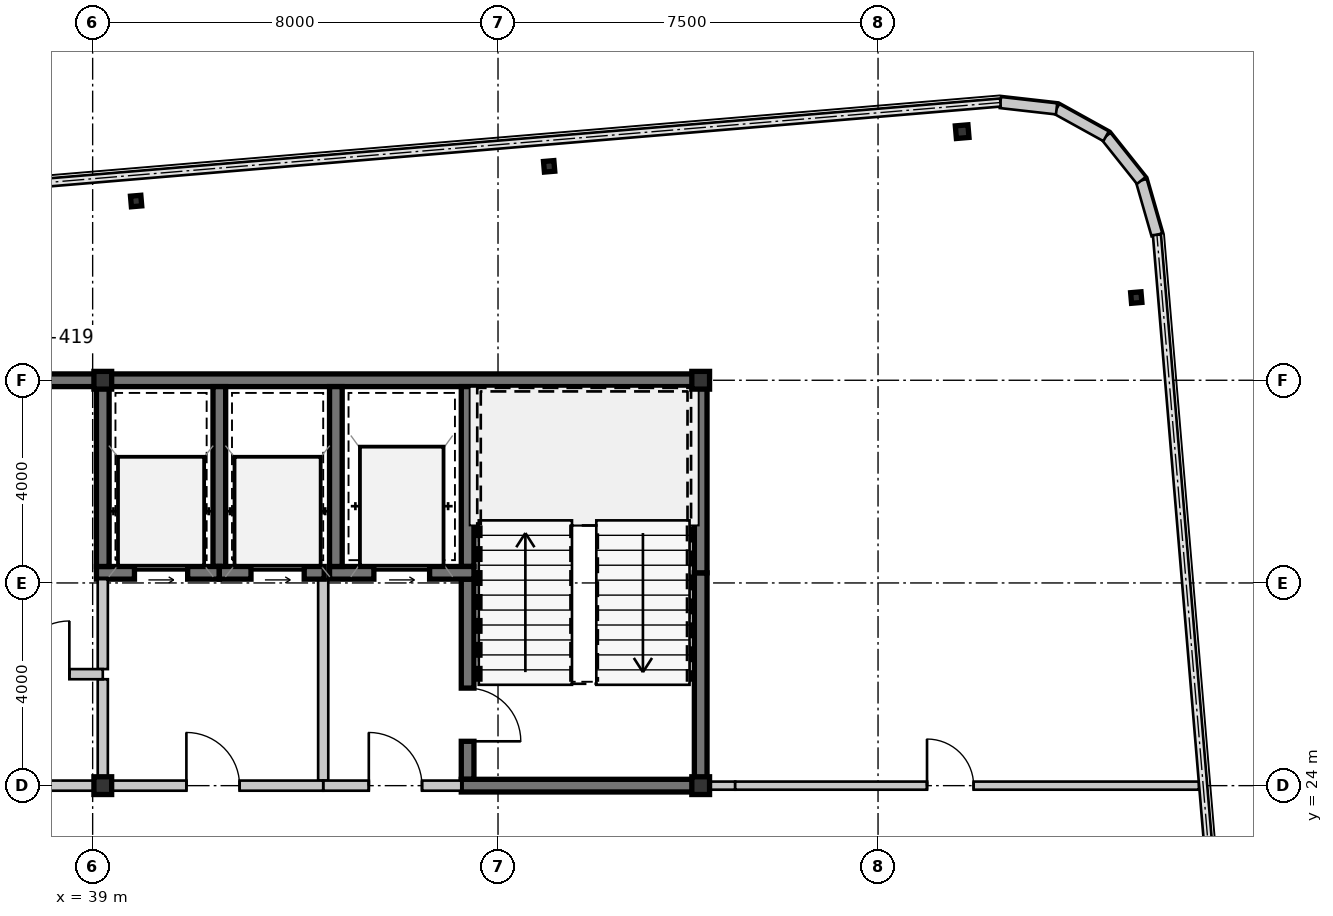
"""IFC4 building model, lengths in metres.
Left out: names, types, materials, properties, quantities, classifications, styles, units other than length and angle.
Written with IfcOpenShell. Run it as: python <this file> out.ifc"""

import sys

from ifc_helpers import new_model, si_unit, direction, frame, frame_2d, origin, origin_2d, place, context, subcontext, project, spatial, rectangle, hollow_rectangle, i_section, extrude, source, transform, mapped, element, fill, save


model = new_model("IFC4")
c1 = context("Model", 3, precision=1e-05, world=origin(), true_north=direction((0.0, 1.0)))
c2 = subcontext(c1, "Body", "Model", "MODEL_VIEW")
j1 = project(units=[si_unit("LENGTHUNIT", "METRE"), si_unit("PLANEANGLEUNIT", "RADIAN")], contexts=[c1])
p1 = place(None, origin())
s1 = spatial("IfcSite", under=j1, at=p1, CompositionType="ELEMENT")
p2 = place(p1, origin())
s2 = spatial("IfcBuilding", under=s1, at=p2, CompositionType="ELEMENT")
p3 = place(p2, frame((0.0, 0.0, 197.75)))
s3 = spatial("IfcBuildingStorey", under=s2, at=p3, CompositionType="ELEMENT", Elevation=197.75)
m1 = source(origin(), c2, "Body", "SweptSolid", [
    extrude(hollow_rectangle(XDim=0.35, YDim=0.35, WallThickness=0.016, at=origin_2d()), origin(), (0.0, 0.0, 1.0), 3.15),
])
for number, where, z_axis, x_axis in (
    (1, (39.2, 24.0, 0.0), (0.0, 0.0, 1.0), (1.0, 0.0, 0.0)),
    (2, (51.0, 24.0, 0.0), (0.0, 0.0, 1.0), (1.0, 0.0, 0.0)),
    (3, (39.2, 32.0, 0.0), (0.0, 0.0, 1.0), (1.0, 0.0, 0.0)),
    (4, (51.0, 32.0, 0.0), (0.0, 0.0, 1.0), (1.0, 0.0, 0.0)),
):
    element("IfcColumn", number, at=place(p3, frame(where, z_axis=z_axis, x_axis=x_axis)), inside=s3, PredefinedType="COLUMN", context=c2, shape_type="MappedRepresentation", body=[
        mapped(m1, transform((0.0, 0.0, 0.0), scale=1.0)),
    ])
m2 = source(origin(), c2, "Body", "SweptSolid", [
    extrude(i_section(OverallWidth=0.205, OverallDepth=0.21, WebThickness=0.009, FlangeThickness=0.014, at=origin_2d()), origin(), (0.0, 0.0, 1.0), 3.15),
])
for number, where, z_axis, x_axis in (
    (5, (39.858, 35.537, 0.0), (0.0, 0.0, 1.0), (0.996, 0.084, 0.0)),
    (6, (48.009, 36.221, 0.0), (0.0, 0.0, 1.0), (0.996, 0.084, 0.0)),
):
    element("IfcColumn", number, at=place(p3, frame(where, z_axis=z_axis, x_axis=x_axis)), inside=s3, PredefinedType="COLUMN", context=c2, shape_type="MappedRepresentation", body=[
        mapped(m2, transform((0.0, 0.0, 0.0), scale=1.0)),
    ])
m3 = source(origin(), c2, "Body", "SweptSolid", [
    extrude(hollow_rectangle(XDim=0.25, YDim=0.25, WallThickness=0.01, at=origin_2d()), origin(), (0.0, 0.0, 1.0), 3.15),
])
p4 = place(p3, frame((56.16, 36.906, 0.0), z_axis=(0.0, 0.0, 1.0), x_axis=(0.99649285925, 0.083677843332, 0.0)))
e7 = element("IfcColumn", 7, at=p4, inside=s3, PredefinedType="COLUMN", context=c2, shape_type="MappedRepresentation", body=[
    mapped(m3, transform((0.0, 0.0, 0.0), scale=1.0)),
])
p5 = place(p3, frame((59.596, 33.632, 0.0), z_axis=(0.0, 0.0, 1.0), x_axis=(0.99649285925, 0.083677843332, 0.0)))
e8 = element("IfcColumn", 8, at=p5, inside=s3, PredefinedType="COLUMN", context=c2, shape_type="MappedRepresentation", body=[
    mapped(m2, transform((0.0, 0.0, 0.0), scale=1.0)),
])
m4 = source(origin(), c2, "Body", "SweptSolid", [
    extrude(rectangle(XDim=1.116, YDim=0.22, at=frame_2d((0.558, 0.0))), origin(), (0.0, 0.0, 1.0), 2.93),
])
for number, where, z_axis, x_axis in (
    (9, (60.004, 34.87, 0.0), (0.0, 0.0, 1.0), (-0.277, 0.961, 0.0)),
    (10, (59.696, 35.943, 0.0), (0.0, 0.0, 1.0), (-0.623, 0.782, 0.0)),
    (11, (59.0, 36.816, 0.0), (0.0, 0.0, 1.0), (-0.875, 0.484, 0.0)),
    (12, (58.024, 37.356, 0.0), (0.0, 0.0, 1.0), (-0.994, 0.112, 0.0)),
):
    element("IfcWall", number, at=place(p3, frame(where, z_axis=z_axis, x_axis=x_axis)), inside=s3, PredefinedType="SOLIDWALL", context=c2, shape_type="MappedRepresentation", body=[
        mapped(m4, transform((0.0, 0.0, 0.0), scale=1.0)),
    ])
m5 = source(origin(), c2, "Body", "SweptSolid", [
    extrude(rectangle(XDim=11.2, YDim=0.25, at=frame_2d((5.6, 0.0))), origin(), (0.0, 0.0, 1.0), 2.93),
])
p6 = place(p3, frame((28.0, 32.0, 0.0), z_axis=(0.0, 0.0, 1.0), x_axis=(1.0, 0.0, 0.0)))
e13 = element("IfcWall", 13, at=p6, inside=s3, PredefinedType="SHEAR", context=c2, shape_type="MappedRepresentation", body=[
    mapped(m5, transform((0.0, 0.0, 0.0), scale=1.0)),
])
m6 = source(origin(), c2, "Body", "SweptSolid", [
    extrude(rectangle(XDim=11.925, YDim=0.25, at=frame_2d((5.962, 0.0))), origin(), (0.0, 0.0, 1.0), 2.93),
])
p7 = place(p3, frame((39.2, 32.0, 0.0), z_axis=(0.0, 0.0, 1.0), x_axis=(1.0, 0.0, 0.0)))
e14 = element("IfcWall", 14, at=p7, inside=s3, PredefinedType="SHEAR", context=c2, shape_type="MappedRepresentation", body=[
    mapped(m6, transform((0.0, 0.0, 0.0), scale=1.0)),
])
m7 = source(origin(), c2, "Body", "SweptSolid", [
    extrude(rectangle(XDim=4.075, YDim=0.25, at=frame_2d((2.038, 0.0))), origin(), (0.0, 0.0, 1.0), 2.93),
])
p8 = place(p3, frame((51.0, 24.125, 0.0), z_axis=(0.0, 0.0, 1.0), x_axis=(0.0, 1.0, 0.0)))
e15 = element("IfcWall", 15, at=p8, inside=s3, PredefinedType="SHEAR", context=c2, shape_type="MappedRepresentation", body=[
    mapped(m7, transform((0.0, 0.0, 0.0), scale=1.0)),
])
m8 = source(origin(), c2, "Body", "SweptSolid", [
    extrude(rectangle(XDim=3.675, YDim=0.25, at=frame_2d((1.837, 0.0))), origin(), (0.0, 0.0, 1.0), 2.93),
])
p9 = place(p3, frame((51.0, 28.2, 0.0), z_axis=(0.0, 0.0, 1.0), x_axis=(0.0, 1.0, 0.0)))
e16 = element("IfcWall", 16, at=p9, inside=s3, PredefinedType="SHEAR", context=c2, shape_type="MappedRepresentation", body=[
    mapped(m8, transform((0.0, 0.0, 0.0), scale=1.0)),
])
m9 = source(origin(), c2, "Body", "SweptSolid", [
    extrude(rectangle(XDim=3.55, YDim=0.25, at=frame_2d((1.775, 0.0))), origin(), (0.0, 0.0, 1.0), 2.93),
])
p10 = place(p3, frame((46.4, 31.875, 0.0), z_axis=(0.0, 0.0, 1.0), x_axis=(0.0, -1.0, 0.0)))
e17 = element("IfcWall", 17, at=p10, inside=s3, PredefinedType="SHEAR", context=c2, shape_type="MappedRepresentation", body=[
    mapped(m9, transform((0.0, 0.0, 0.0), scale=1.0)),
])
m10 = source(origin(), c2, "Body", "SweptSolid", [
    extrude(rectangle(XDim=3.95, YDim=0.25, at=frame_2d((1.975, 0.0))), origin(), (0.0, 0.0, 1.0), 2.93),
])
p11 = place(p3, frame((46.4, 28.075, 0.0), z_axis=(0.0, 0.0, 1.0), x_axis=(0.0, -1.0, 0.0)))
e18 = element("IfcWall", 18, at=p11, inside=s3, PredefinedType="SHEAR", context=c2, shape_type="MappedRepresentation", body=[
    mapped(m10, transform((0.0, 0.0, 0.0), scale=1.0)),
])
m11 = source(origin(), c2, "Body", "SweptSolid", [
    extrude(rectangle(XDim=1.05, YDim=2.1, at=frame_2d((0.525, 1.05))), frame((0.0, 0.135, 0.0), z_axis=(0.0, -1.0, 0.0), x_axis=(1.0, 0.0, 0.0)), (0.0, 0.0, 1.0), 0.27),
])
p12 = place(p11, frame((2.15, 0.0, 0.0)))
e19 = element("IfcOpeningElement", 19, at=p12, cuts=e18, PredefinedType="OPENING", context=c2, shape_type="MappedRepresentation", body=[
    mapped(m11, transform((0.0, 0.0, 0.0), scale=1.0)),
])
m12 = source(origin(), c2, "Body", "SweptSolid", [
    extrude(rectangle(XDim=4.85, YDim=0.25, at=frame_2d((2.425, 0.0))), origin(), (0.0, 0.0, 1.0), 2.93),
])
p13 = place(p3, frame((46.275, 24.0, 0.0), z_axis=(0.0, 0.0, 1.0), x_axis=(1.0, 0.0, 0.0)))
e20 = element("IfcWall", 20, at=p13, inside=s3, PredefinedType="SHEAR", context=c2, shape_type="MappedRepresentation", body=[
    mapped(m12, transform((0.0, 0.0, 0.0), scale=1.0)),
])
m13 = source(origin(), c2, "Body", "SweptSolid", [
    extrude(rectangle(XDim=2.85, YDim=0.25, at=frame_2d((1.425, 0.0))), origin(), (0.0, 0.0, 1.0), 2.93),
])
p14 = place(p3, frame((43.675, 28.2, 0.0), z_axis=(0.0, 0.0, 1.0), x_axis=(1.0, 0.0, 0.0)))
e21 = element("IfcWall", 21, at=p14, inside=s3, PredefinedType="SHEAR", context=c2, shape_type="MappedRepresentation", body=[
    mapped(m13, transform((0.0, 0.0, 0.0), scale=1.0)),
])
m14 = source(origin(), c2, "Body", "SweptSolid", [
    extrude(rectangle(XDim=1.1, YDim=2.15, at=frame_2d((0.55, 1.075))), frame((0.0, 0.135, 0.0), z_axis=(0.0, -1.0, 0.0), x_axis=(1.0, 0.0, 0.0)), (0.0, 0.0, 1.0), 0.27),
])
p15 = place(p14, frame((0.875, 0.0, 0.0)))
e22 = element("IfcOpeningElement", 22, at=p15, cuts=e21, PredefinedType="OPENING", context=c2, shape_type="MappedRepresentation", body=[
    mapped(m14, transform((0.0, 0.0, 0.0), scale=1.0)),
])
p16 = place(p3, frame((43.8, 31.875, 0.0), z_axis=(0.0, 0.0, 1.0), x_axis=(0.0, -1.0, 0.0)))
e23 = element("IfcWall", 23, at=p16, inside=s3, PredefinedType="SHEAR", context=c2, shape_type="MappedRepresentation", body=[
    mapped(m9, transform((0.0, 0.0, 0.0), scale=1.0)),
])
m15 = source(origin(), c2, "Body", "SweptSolid", [
    extrude(rectangle(XDim=3.975, YDim=0.2, at=frame_2d((1.987, 0.0))), origin(), (0.0, 0.0, 1.0), 2.93),
])
p17 = place(p3, frame((43.55, 28.075, 0.0), z_axis=(0.0, 0.0, 1.0), x_axis=(0.0, -1.0, 0.0)))
e24 = element("IfcWall", 24, at=p17, inside=s3, PredefinedType="SOLIDWALL", context=c2, shape_type="MappedRepresentation", body=[
    mapped(m15, transform((0.0, 0.0, 0.0), scale=1.0)),
])
m16 = source(origin(), c2, "Body", "SweptSolid", [
    extrude(rectangle(XDim=2.725, YDim=0.2, at=frame_2d((1.362, 0.0))), origin(), (0.0, 0.0, 1.0), 2.397),
])
p18 = place(p3, frame((43.55, 24.0, 0.0), z_axis=(0.0, 0.0, 1.0), x_axis=(1.0, 0.0, 0.0)))
e25 = element("IfcWall", 25, at=p18, inside=s3, PredefinedType="SOLIDWALL", context=c2, shape_type="MappedRepresentation", body=[
    mapped(m16, transform((0.0, 0.0, 0.0), scale=1.0)),
])
m17 = source(origin(), c2, "Body", "SweptSolid", [
    extrude(rectangle(XDim=1.05, YDim=2.1, at=frame_2d((0.525, 1.05))), frame((0.0, 0.11, 0.0), z_axis=(0.0, -1.0, 0.0), x_axis=(1.0, 0.0, 0.0)), (0.0, 0.0, 1.0), 0.22),
])
p19 = place(p18, frame((0.9, 0.0, 0.0)))
e26 = element("IfcOpeningElement", 26, at=p19, cuts=e25, PredefinedType="OPENING", context=c2, shape_type="MappedRepresentation", body=[
    mapped(m17, transform((0.0, 0.0, 0.0), scale=1.0)),
])
p20 = place(p3, frame((41.5, 28.325, 0.0), z_axis=(0.0, 0.0, 1.0), x_axis=(0.0, 1.0, 0.0)))
e27 = element("IfcWall", 27, at=p20, inside=s3, PredefinedType="SHEAR", context=c2, shape_type="MappedRepresentation", body=[
    mapped(m9, transform((0.0, 0.0, 0.0), scale=1.0)),
])
m18 = source(origin(), c2, "Body", "SweptSolid", [
    extrude(rectangle(XDim=2.425, YDim=0.25, at=frame_2d((1.212, 0.0))), origin(), (0.0, 0.0, 1.0), 2.93),
])
p21 = place(p3, frame((39.075, 28.2, 0.0), z_axis=(0.0, 0.0, 1.0), x_axis=(1.0, 0.0, 0.0)))
e28 = element("IfcWall", 28, at=p21, inside=s3, PredefinedType="SHEAR", context=c2, shape_type="MappedRepresentation", body=[
    mapped(m18, transform((0.0, 0.0, 0.0), scale=1.0)),
])
m19 = source(origin(), c2, "Body", "SweptSolid", [
    extrude(rectangle(XDim=1.05, YDim=2.15, at=frame_2d((0.525, 1.075))), frame((0.0, 0.135, 0.0), z_axis=(0.0, -1.0, 0.0), x_axis=(1.0, 0.0, 0.0)), (0.0, 0.0, 1.0), 0.27),
])
p22 = place(p21, frame((0.75, 0.0, 0.0)))
e29 = element("IfcOpeningElement", 29, at=p22, cuts=e28, PredefinedType="OPENING", context=c2, shape_type="MappedRepresentation", body=[
    mapped(m19, transform((0.0, 0.0, 0.0), scale=1.0)),
])
p23 = place(p3, frame((39.2, 31.875, 0.0), z_axis=(0.0, 0.0, 1.0), x_axis=(0.0, -1.0, 0.0)))
e30 = element("IfcWall", 30, at=p23, inside=s3, PredefinedType="SHEAR", context=c2, shape_type="MappedRepresentation", body=[
    mapped(m9, transform((0.0, 0.0, 0.0), scale=1.0)),
])
m20 = source(origin(), c2, "Body", "SweptSolid", [
    extrude(rectangle(XDim=2.07, YDim=0.25, at=frame_2d((1.035, 0.0))), origin(), (0.0, 0.0, 1.0), 2.93),
])
p24 = place(p3, frame((41.5, 28.2, 0.0), z_axis=(0.0, 0.0, 1.0), x_axis=(1.0, 0.0, 0.0)))
e31 = element("IfcWall", 31, at=p24, inside=s3, PredefinedType="SHEAR", context=c2, shape_type="MappedRepresentation", body=[
    mapped(m20, transform((0.0, 0.0, 0.0), scale=1.0)),
])
p25 = place(p24, frame((0.625, 0.0, 0.0)))
e32 = element("IfcOpeningElement", 32, at=p25, cuts=e31, PredefinedType="OPENING", context=c2, shape_type="MappedRepresentation", body=[
    mapped(m19, transform((0.0, 0.0, 0.0), scale=1.0)),
])
m21 = source(origin(), c2, "Body", "SweptSolid", [
    extrude(rectangle(XDim=2.0, YDim=0.2, at=frame_2d((1.0, 0.0))), origin(), (0.0, 0.0, 1.0), 2.47),
])
p26 = place(p3, frame((39.2, 24.1, 0.0), z_axis=(0.0, 0.0, 1.0), x_axis=(0.0, 1.0, 0.0)))
e33 = element("IfcWall", 33, at=p26, inside=s3, PredefinedType="SOLIDWALL", context=c2, shape_type="MappedRepresentation", body=[
    mapped(m21, transform((0.0, 0.0, 0.0), scale=1.0)),
])
m22 = source(origin(), c2, "Body", "SweptSolid", [
    extrude(rectangle(XDim=1.775, YDim=0.2, at=frame_2d((0.887, 0.0))), origin(), (0.0, 0.0, 1.0), 2.47),
])
p27 = place(p3, frame((39.2, 26.3, 0.0), z_axis=(0.0, 0.0, 1.0), x_axis=(0.0, 1.0, 0.0)))
e34 = element("IfcWall", 34, at=p27, inside=s3, PredefinedType="SOLIDWALL", context=c2, shape_type="MappedRepresentation", body=[
    mapped(m22, transform((0.0, 0.0, 0.0), scale=1.0)),
])
m23 = source(origin(), c2, "Body", "SweptSolid", [
    extrude(rectangle(XDim=4.35, YDim=0.2, at=frame_2d((2.175, 0.0))), origin(), (0.0, 0.0, 1.0), 2.397),
])
p28 = place(p3, frame((43.55, 24.0, 0.0), z_axis=(0.0, 0.0, 1.0), x_axis=(-1.0, 0.0, 0.0)))
e35 = element("IfcWall", 35, at=p28, inside=s3, PredefinedType="SOLIDWALL", context=c2, shape_type="MappedRepresentation", body=[
    mapped(m23, transform((0.0, 0.0, 0.0), scale=1.0)),
])
p29 = place(p28, frame((1.65, 0.0, 0.0)))
e36 = element("IfcOpeningElement", 36, at=p29, cuts=e35, PredefinedType="OPENING", context=c2, shape_type="MappedRepresentation", body=[
    mapped(m17, transform((0.0, 0.0, 0.0), scale=1.0)),
])
m24 = source(origin(), c2, "Body", "SweptSolid", [
    extrude(rectangle(XDim=2.37, YDim=0.2, at=frame_2d((1.185, 0.0))), origin(), (0.0, 0.0, 1.0), 2.93),
])
p30 = place(p3, frame((36.83, 26.2, 0.0), z_axis=(0.0, 0.0, 1.0), x_axis=(1.0, 0.0, 0.0)))
e37 = element("IfcWall", 37, at=p30, inside=s3, PredefinedType="SOLIDWALL", context=c2, shape_type="MappedRepresentation", body=[
    mapped(m24, transform((0.0, 0.0, 0.0), scale=1.0)),
])
p31 = place(p30, frame((0.66, 0.0, 0.0)))
e38 = element("IfcOpeningElement", 38, at=p31, cuts=e37, PredefinedType="OPENING", context=c2, shape_type="MappedRepresentation", body=[
    mapped(m17, transform((0.0, 0.0, 0.0), scale=1.0)),
])
m25 = source(origin(), c2, "Body", "SweptSolid", [
    extrude(rectangle(XDim=4.05, YDim=0.2, at=frame_2d((2.025, 0.0))), origin(), (0.0, 0.0, 1.0), 2.47),
])
p32 = place(p3, frame((39.2, 24.0, 0.0), z_axis=(0.0, 0.0, 1.0), x_axis=(-1.0, 0.0, 0.0)))
e39 = element("IfcWall", 39, at=p32, inside=s3, PredefinedType="SOLIDWALL", context=c2, shape_type="MappedRepresentation", body=[
    mapped(m25, transform((0.0, 0.0, 0.0), scale=1.0)),
])
p33 = place(p32, frame((1.5, 0.0, 0.0)))
e40 = element("IfcOpeningElement", 40, at=p33, cuts=e39, PredefinedType="OPENING", context=c2, shape_type="MappedRepresentation", body=[
    mapped(m17, transform((0.0, 0.0, 0.0), scale=1.0)),
])
m26 = source(origin(), c2, "Body", "SweptSolid", [
    extrude(rectangle(XDim=0.556, YDim=0.16, at=frame_2d((0.278, 0.0))), origin(), (0.0, 0.0, 1.0), 2.47),
])
p34 = place(p3, frame((51.125, 24.0, 0.0), z_axis=(0.0, 0.0, 1.0), x_axis=(1.0, 0.0, 0.0)))
e41 = element("IfcWall", 41, at=p34, inside=s3, PredefinedType="PARTITIONING", context=c2, shape_type="MappedRepresentation", body=[
    mapped(m26, transform((0.0, 0.0, 0.0), scale=1.0)),
])
m27 = source(origin(), c2, "Body", "SweptSolid", [
    extrude(rectangle(XDim=9.153, YDim=0.16, at=frame_2d((4.576, 0.0))), origin(), (0.0, 0.0, 1.0), 2.93),
])
p35 = place(p3, frame((51.681, 24.0, 0.0), z_axis=(0.0, 0.0, 1.0), x_axis=(1.0, 0.0, 0.0)))
e42 = element("IfcWall", 42, at=p35, inside=s3, PredefinedType="PARTITIONING", context=c2, shape_type="MappedRepresentation", body=[
    mapped(m27, transform((0.0, 0.0, 0.0), scale=1.0)),
])
m28 = source(origin(), c2, "Body", "SweptSolid", [
    extrude(rectangle(XDim=0.92, YDim=2.1, at=frame_2d((0.46, 1.05))), frame((0.0, 0.09, 0.0), z_axis=(0.0, -1.0, 0.0), x_axis=(1.0, 0.0, 0.0)), (0.0, 0.0, 1.0), 0.18),
])
p36 = place(p35, frame((3.786, 0.0, 0.0)))
e43 = element("IfcOpeningElement", 43, at=p36, cuts=e42, PredefinedType="OPENING", context=c2, shape_type="MappedRepresentation", body=[
    mapped(m28, transform((0.0, 0.0, 0.0), scale=1.0)),
])
m29 = source(origin(), c2, "Body", "SweptSolid", [
    extrude(rectangle(XDim=1.05, YDim=2.1, at=frame_2d((0.525, 1.05))), frame((0.0, 0.025, 0.0), z_axis=(0.0, -1.0, 0.0), x_axis=(1.0, 0.0, 0.0)), (0.0, 0.0, 1.0), 0.05),
])
p37 = place(p12, origin())
e44 = element("IfcDoor", 44, at=p37, inside=s3, OperationType="SINGLE_SWING_RIGHT", PredefinedType="DOOR", context=c2, shape_type="MappedRepresentation", body=[
    mapped(m29, transform((0.0, 0.0, 0.0), scale=1.0)),
])
fill(e19, e44)
m30 = source(origin(), c2, "Body", "SweptSolid", [
    extrude(rectangle(XDim=1.1, YDim=2.15, at=frame_2d((0.55, 1.075))), frame((0.0, 0.025, 0.0), z_axis=(0.0, -1.0, 0.0), x_axis=(1.0, 0.0, 0.0)), (0.0, 0.0, 1.0), 0.05),
])
p38 = place(p15, origin())
e45 = element("IfcDoor", 45, at=p38, inside=s3, OperationType="SLIDING_TO_LEFT", PredefinedType="DOOR", context=c2, shape_type="MappedRepresentation", body=[
    mapped(m30, transform((0.0, 0.0, 0.0), scale=1.0)),
])
fill(e22, e45)
p39 = place(p19, origin())
e46 = element("IfcDoor", 46, at=p39, inside=s3, OperationType="SINGLE_SWING_LEFT", PredefinedType="DOOR", context=c2, shape_type="MappedRepresentation", body=[
    mapped(m29, transform((0.0, 0.0, 0.0), scale=1.0)),
])
fill(e26, e46)
m31 = source(origin(), c2, "Body", "SweptSolid", [
    extrude(rectangle(XDim=1.05, YDim=2.15, at=frame_2d((0.525, 1.075))), frame((0.0, 0.025, 0.0), z_axis=(0.0, -1.0, 0.0), x_axis=(1.0, 0.0, 0.0)), (0.0, 0.0, 1.0), 0.05),
])
p40 = place(p22, origin())
e47 = element("IfcDoor", 47, at=p40, inside=s3, OperationType="SLIDING_TO_LEFT", PredefinedType="DOOR", context=c2, shape_type="MappedRepresentation", body=[
    mapped(m31, transform((0.0, 0.0, 0.0), scale=1.0)),
])
fill(e29, e47)
p41 = place(p25, origin())
e48 = element("IfcDoor", 48, at=p41, inside=s3, OperationType="SLIDING_TO_LEFT", PredefinedType="DOOR", context=c2, shape_type="MappedRepresentation", body=[
    mapped(m31, transform((0.0, 0.0, 0.0), scale=1.0)),
])
fill(e32, e48)
p42 = place(p29, frame((1.05, 0.0, 0.0), z_axis=(0.0, 0.0, 1.0), x_axis=(-1.0, 0.0, 0.0)))
e49 = element("IfcDoor", 49, at=p42, inside=s3, OperationType="SINGLE_SWING_LEFT", PredefinedType="DOOR", context=c2, shape_type="MappedRepresentation", body=[
    mapped(m29, transform((0.0, 0.0, 0.0), scale=1.0)),
])
fill(e36, e49)
p43 = place(p31, origin())
e50 = element("IfcDoor", 50, at=p43, inside=s3, OperationType="SINGLE_SWING_RIGHT", PredefinedType="DOOR", context=c2, shape_type="MappedRepresentation", body=[
    mapped(m29, transform((0.0, 0.0, 0.0), scale=1.0)),
])
fill(e38, e50)
m32 = source(origin(), c2, "Body", "SweptSolid", [
    extrude(rectangle(XDim=0.92, YDim=2.1, at=frame_2d((0.46, 1.05))), frame((0.0, 0.025, 0.0), z_axis=(0.0, -1.0, 0.0), x_axis=(1.0, 0.0, 0.0)), (0.0, 0.0, 1.0), 0.05),
])
p44 = place(p36, origin())
e51 = element("IfcDoor", 51, at=p44, inside=s3, OperationType="SINGLE_SWING_LEFT", PredefinedType="DOOR", context=c2, shape_type="MappedRepresentation", body=[
    mapped(m32, transform((0.0, 0.0, 0.0), scale=1.0)),
])
fill(e43, e51)
save(model, sys.argv[1])
